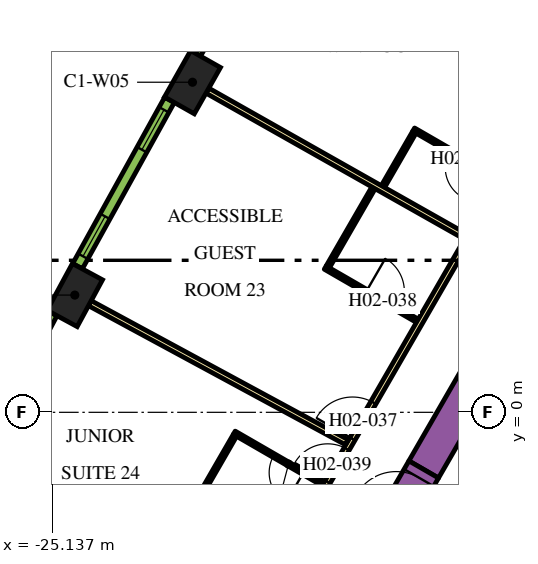
"""IFC4 building model, lengths in metres.
Left out: names, types, materials, properties, quantities, classifications, styles, units other than length and angle.
Written with IfcOpenShell. Run it as: python <this file> out.ifc"""

import sys

from ifc_helpers import new_model, si_unit, direction, frame, frame_2d, origin, origin_2d, place, context, subcontext, project, spatial, rectangle, extrude, element, fill, save


model = new_model("IFC4")
c1 = context("Model", 3, precision=1e-05, world=origin(), true_north=direction((0.0, 1.0)))
c2 = subcontext(c1, "Body", "Model", "MODEL_VIEW")
j1 = project(units=[si_unit("LENGTHUNIT", "METRE"), si_unit("PLANEANGLEUNIT", "RADIAN")], contexts=[c1])
p1 = place(None, origin())
s1 = spatial("IfcSite", under=j1, at=p1, CompositionType="ELEMENT")
p2 = place(p1, origin())
s2 = spatial("IfcBuilding", under=s1, at=p2, CompositionType="ELEMENT")
p3 = place(p2, frame((0.0, 0.0, 47.1)))
s3 = spatial("IfcBuildingStorey", under=s2, at=p3, CompositionType="ELEMENT", Elevation=47.1)
for number, where, z_axis, x_axis in (
    (1, (-21.443, 8.685, 0.0), (0.0, 0.0, 1.0), (-0.492, -0.871, 0.0)),
    (2, (-24.54, 3.085, 0.0), (0.0, 0.0, 1.0), (-0.476, -0.88, 0.0)),
):
    element("IfcColumn", number, at=place(p3, frame(where, z_axis=z_axis, x_axis=x_axis)), inside=s3, PredefinedType="COLUMN", context=c2, shape_type="SweptSolid", body=[
        extrude(rectangle(XDim=1.4, YDim=0.9, at=origin_2d()), origin(), (0.0, 0.0, 1.0), 3.9),
    ])
p4 = place(p3, frame((-15.36, -1.503, 0.0), z_axis=(0.0, 0.0, 1.0), x_axis=(0.50000389221, 0.866023156604, 0.0)))
e3 = element("IfcWall", 3, at=p4, inside=s3, PredefinedType="SOLIDWALL", context=c2, shape_type="SweptSolid", body=[
    extrude(rectangle(XDim=21.0, YDim=0.9, at=frame_2d((10.5, 0.0))), origin(), (0.0, 0.0, 1.0), 3.9),
])
p5 = place(p3, frame((-16.209, -2.976, 0.0), z_axis=(0.0, 0.0, 1.0), x_axis=(0.499954529098, 0.86605165483, 0.0)))
e4 = element("IfcWall", 4, at=p5, inside=s3, PredefinedType="SOLIDWALL", context=c2, shape_type="SweptSolid", body=[
    extrude(rectangle(XDim=1.7, YDim=0.9, at=frame_2d((0.85, 0.0))), origin(), (0.0, 0.0, 1.0), 3.9),
])
p6 = place(p5, frame((0.25, 0.0, 0.0)))
e5 = element("IfcOpeningElement", 5, at=p6, cuts=e4, PredefinedType="OPENING", context=c2, shape_type="SweptSolid", body=[
    extrude(rectangle(XDim=1.2, YDim=2.1, at=frame_2d((0.6, 1.05))), frame((0.0, 0.46, 0.0), z_axis=(0.0, -1.0, 0.0), x_axis=(1.0, 0.0, 0.0)), (0.0, 0.0, 1.0), 0.92),
])
p7 = place(p3, frame((-19.081, -3.9, 0.0), z_axis=(0.0, 0.0, 1.0), x_axis=(0.499998313975, 0.866026377209, 0.0)))
e6 = element("IfcWall", 6, at=p7, inside=s3, PredefinedType="PARTITIONING", context=c2, shape_type="SweptSolid", body=[
    extrude(rectangle(XDim=25.766, YDim=0.15, at=frame_2d((12.883, 0.0))), origin(), (0.0, 0.0, 1.0), 2.75),
])
p8 = place(p7, frame((16.196, 0.0, 0.0)))
e7 = element("IfcOpeningElement", 7, at=p8, cuts=e6, PredefinedType="OPENING", context=c2, shape_type="SweptSolid", body=[
    extrude(rectangle(XDim=1.0, YDim=2.1, at=frame_2d((0.5, 1.05))), frame((0.0, 0.085, 0.0), z_axis=(0.0, -1.0, 0.0), x_axis=(1.0, 0.0, 0.0)), (0.0, 0.0, 1.0), 0.17),
])
p9 = place(p7, frame((14.889, 0.0, 0.0)))
e8 = element("IfcOpeningElement", 8, at=p9, cuts=e6, PredefinedType="OPENING", context=c2, shape_type="SweptSolid", body=[
    extrude(rectangle(XDim=1.0, YDim=2.1, at=frame_2d((0.5, 1.05))), frame((0.0, 0.085, 0.0), z_axis=(0.0, -1.0, 0.0), x_axis=(1.0, 0.0, 0.0)), (0.0, 0.0, 1.0), 0.17),
])
p10 = place(p7, frame((3.698, 0.0, 0.0)))
e9 = element("IfcOpeningElement", 9, at=p10, cuts=e6, PredefinedType="OPENING", context=c2, shape_type="SweptSolid", body=[
    extrude(rectangle(XDim=1.1, YDim=2.1, at=frame_2d((0.55, 1.05))), frame((0.0, 0.085, 0.0), z_axis=(0.0, -1.0, 0.0), x_axis=(1.0, 0.0, 0.0)), (0.0, 0.0, 1.0), 0.17),
])
p11 = place(p7, frame((2.392, 0.0, 0.0)))
e10 = element("IfcOpeningElement", 10, at=p11, cuts=e6, PredefinedType="OPENING", context=c2, shape_type="SweptSolid", body=[
    extrude(rectangle(XDim=1.0, YDim=2.1, at=frame_2d((0.5, 1.05))), frame((0.0, 0.085, 0.0), z_axis=(0.0, -1.0, 0.0), x_axis=(1.0, 0.0, 0.0)), (0.0, 0.0, 1.0), 0.17),
])
p12 = place(p3, frame((-24.145, 2.871, 0.0), z_axis=(0.0, 0.0, 1.0), x_axis=(0.879551725039, -0.475803281809, 0.0)))
e11 = element("IfcWall", 11, at=p12, inside=s3, PredefinedType="PARTITIONING", context=c2, shape_type="SweptSolid", body=[
    extrude(rectangle(XDim=7.688, YDim=0.15, at=frame_2d((3.844, 0.0))), origin(), (0.0, 0.0, 1.0), 2.75),
])
p13 = place(p3, frame((-21.052, 8.464, 0.0), z_axis=(0.0, 0.0, 1.0), x_axis=(0.87059371954, -0.492002617368, 0.0)))
e12 = element("IfcWall", 12, at=p13, inside=s3, PredefinedType="PARTITIONING", context=c2, shape_type="SweptSolid", body=[
    extrude(rectangle(XDim=7.803, YDim=0.15, at=frame_2d((3.902, 0.0))), origin(), (0.0, 0.0, 1.0), 2.75),
])
p14 = place(p3, frame((-13.373, 6.138, 0.0), z_axis=(0.0, 0.0, 1.0), x_axis=(-0.866062058628, 0.499936506574, 0.0)))
e13 = element("IfcWall", 13, at=p14, inside=s3, PredefinedType="PARTITIONING", context=c2, shape_type="SweptSolid", body=[
    extrude(rectangle(XDim=2.6, YDim=0.1, at=frame_2d((1.3, 0.0))), origin(), (0.0, 0.0, 1.0), 2.75),
])
p15 = place(p14, frame((0.6, 0.0, 0.0)))
e14 = element("IfcOpeningElement", 14, at=p15, cuts=e13, PredefinedType="OPENING", context=c2, shape_type="SweptSolid", body=[
    extrude(rectangle(XDim=0.9, YDim=2.1, at=frame_2d((0.45, 1.05))), frame((0.0, 0.06, 0.0), z_axis=(0.0, -1.0, 0.0), x_axis=(1.0, 0.0, 0.0)), (0.0, 0.0, 1.0), 0.12),
])
p16 = place(p3, frame((-15.606, 7.37, 0.0), z_axis=(0.0, 0.0, 1.0), x_axis=(-0.499974350878, -0.866040211805, 0.0)))
e15 = element("IfcWall", 15, at=p16, inside=s3, PredefinedType="PARTITIONING", context=c2, shape_type="SweptSolid", body=[
    extrude(rectangle(XDim=1.65, YDim=0.1, at=frame_2d((0.825, 0.0))), origin(), (0.0, 0.0, 1.0), 2.75),
])
p17 = place(p3, frame((-17.951, 3.808, 0.0), z_axis=(0.0, 0.0, 1.0), x_axis=(0.866034573852, -0.49998411664, 0.0)))
e16 = element("IfcWall", 16, at=p17, inside=s3, PredefinedType="PARTITIONING", context=c2, shape_type="SweptSolid", body=[
    extrude(rectangle(XDim=2.8, YDim=0.1, at=frame_2d((1.4, 0.0))), origin(), (0.0, 0.0, 1.0), 2.75),
])
p18 = place(p17, frame((1.25, 0.0, 0.0)))
e17 = element("IfcOpeningElement", 17, at=p18, cuts=e16, PredefinedType="OPENING", context=c2, shape_type="SweptSolid", body=[
    extrude(rectangle(XDim=1.0, YDim=2.1, at=frame_2d((0.5, 1.05))), frame((0.0, 0.06, 0.0), z_axis=(0.0, -1.0, 0.0), x_axis=(1.0, 0.0, 0.0)), (0.0, 0.0, 1.0), 0.12),
])
p19 = place(p3, frame((-17.878, 3.835, 0.0), z_axis=(0.0, 0.0, 1.0), x_axis=(0.500061428766, 0.865989934965, 0.0)))
e18 = element("IfcWall", 18, at=p19, inside=s3, PredefinedType="PARTITIONING", context=c2, shape_type="SweptSolid", body=[
    extrude(rectangle(XDim=2.39, YDim=0.1, at=frame_2d((1.195, 0.0))), origin(), (0.0, 0.0, 1.0), 2.75),
])
p20 = place(p3, frame((-18.006, -1.888, 0.0), z_axis=(0.0, 0.0, 1.0), x_axis=(-0.866036505625, 0.499980770555, 0.0)))
e19 = element("IfcWall", 19, at=p20, inside=s3, PredefinedType="PARTITIONING", context=c2, shape_type="SweptSolid", body=[
    extrude(rectangle(XDim=2.7, YDim=0.1, at=frame_2d((1.35, 0.0))), origin(), (0.0, 0.0, 1.0), 2.75),
])
p21 = place(p20, frame((0.6, 0.0, 0.0)))
e20 = element("IfcOpeningElement", 20, at=p21, cuts=e19, PredefinedType="OPENING", context=c2, shape_type="SweptSolid", body=[
    extrude(rectangle(XDim=0.9, YDim=2.1, at=frame_2d((0.45, 1.05))), frame((0.0, 0.06, 0.0), z_axis=(0.0, -1.0, 0.0), x_axis=(1.0, 0.0, 0.0)), (0.0, 0.0, 1.0), 0.12),
])
p22 = place(p3, frame((-20.326, -0.606, 0.0), z_axis=(0.0, 0.0, 1.0), x_axis=(-0.499946605688, -0.86605622881, 0.0)))
e21 = element("IfcWall", 21, at=p22, inside=s3, PredefinedType="PARTITIONING", context=c2, shape_type="SweptSolid", body=[
    extrude(rectangle(XDim=2.2, YDim=0.1, at=frame_2d((1.1, 0.0))), origin(), (0.0, 0.0, 1.0), 2.75),
])
p23 = place(p3, frame((-18.858, 13.773, 0.0), z_axis=(0.0, 0.0, 1.0), x_axis=(-0.50002123722, -0.866013142123, 0.0)))
e22 = element("IfcWall", 22, at=p23, inside=s3, PredefinedType="SOLIDWALL", context=c2, shape_type="SweptSolid", body=[
    extrude(rectangle(XDim=4.998, YDim=0.29, at=frame_2d((2.499, 0.0))), origin(), (0.0, 0.0, 1.0), 3.65),
])
p24 = place(p23, frame((0.297, 0.0, 0.9)))
e23 = element("IfcOpeningElement", 23, at=p24, cuts=e22, PredefinedType="OPENING", context=c2, shape_type="SweptSolid", body=[
    extrude(rectangle(XDim=1.2, YDim=2.15, at=frame_2d((0.6, 1.075))), frame((0.0, 0.155, 0.0), z_axis=(0.0, -1.0, 0.0), x_axis=(1.0, 0.0, 0.0)), (0.0, 0.0, 1.0), 0.31),
])
p25 = place(p23, frame((3.501, 0.0, 0.9)))
e24 = element("IfcOpeningElement", 24, at=p25, cuts=e22, PredefinedType="OPENING", context=c2, shape_type="SweptSolid", body=[
    extrude(rectangle(XDim=1.2, YDim=2.15, at=frame_2d((0.6, 1.075))), frame((0.0, 0.155, 0.0), z_axis=(0.0, -1.0, 0.0), x_axis=(1.0, 0.0, 0.0)), (0.0, 0.0, 1.0), 0.31),
])
p26 = place(p3, frame((-22.05, 8.22, 0.0), z_axis=(0.0, 0.0, 1.0), x_axis=(-0.483912572871, -0.875116347589, 0.0)))
e25 = element("IfcWall", 25, at=p26, inside=s3, PredefinedType="SOLIDWALL", context=c2, shape_type="SweptSolid", body=[
    extrude(rectangle(XDim=4.998, YDim=0.29, at=frame_2d((2.499, 0.0))), origin(), (0.0, 0.0, 1.0), 3.65),
])
p27 = place(p26, frame((0.297, 0.0, 0.9)))
e26 = element("IfcOpeningElement", 26, at=p27, cuts=e25, PredefinedType="OPENING", context=c2, shape_type="SweptSolid", body=[
    extrude(rectangle(XDim=1.2, YDim=2.15, at=frame_2d((0.6, 1.075))), frame((0.0, 0.155, 0.0), z_axis=(0.0, -1.0, 0.0), x_axis=(1.0, 0.0, 0.0)), (0.0, 0.0, 1.0), 0.31),
])
p28 = place(p26, frame((3.501, 0.0, 0.9)))
e27 = element("IfcOpeningElement", 27, at=p28, cuts=e25, PredefinedType="OPENING", context=c2, shape_type="SweptSolid", body=[
    extrude(rectangle(XDim=1.2, YDim=2.15, at=frame_2d((0.6, 1.075))), frame((0.0, 0.155, 0.0), z_axis=(0.0, -1.0, 0.0), x_axis=(1.0, 0.0, 0.0)), (0.0, 0.0, 1.0), 0.31),
])
p29 = place(p3, frame((-25.138, 2.608, 0.0), z_axis=(0.0, 0.0, 1.0), x_axis=(-0.467629620899, -0.883924509026, 0.0)))
e28 = element("IfcWall", 28, at=p29, inside=s3, PredefinedType="SOLIDWALL", context=c2, shape_type="SweptSolid", body=[
    extrude(rectangle(XDim=4.998, YDim=0.29, at=frame_2d((2.499, 0.0))), origin(), (0.0, 0.0, 1.0), 3.65),
])
p30 = place(p29, frame((0.297, 0.0, 0.9)))
e29 = element("IfcOpeningElement", 29, at=p30, cuts=e28, PredefinedType="OPENING", context=c2, shape_type="SweptSolid", body=[
    extrude(rectangle(XDim=1.2, YDim=2.15, at=frame_2d((0.6, 1.075))), frame((0.0, 0.155, 0.0), z_axis=(0.0, -1.0, 0.0), x_axis=(1.0, 0.0, 0.0)), (0.0, 0.0, 1.0), 0.31),
])
p31 = place(p29, frame((3.501, 0.0, 0.9)))
e30 = element("IfcOpeningElement", 30, at=p31, cuts=e28, PredefinedType="OPENING", context=c2, shape_type="SweptSolid", body=[
    extrude(rectangle(XDim=1.2, YDim=2.15, at=frame_2d((0.6, 1.075))), frame((0.0, 0.155, 0.0), z_axis=(0.0, -1.0, 0.0), x_axis=(1.0, 0.0, 0.0)), (0.0, 0.0, 1.0), 0.31),
])
p32 = place(p6, origin())
e31 = element("IfcDoor", 31, at=p32, inside=s3, OperationType="SINGLE_SWING_LEFT", PredefinedType="DOOR", context=c2, shape_type="SweptSolid", body=[
    extrude(rectangle(XDim=1.2, YDim=2.1, at=frame_2d((0.6, 1.05))), frame((0.0, 0.025, 0.0), z_axis=(0.0, -1.0, 0.0), x_axis=(1.0, 0.0, 0.0)), (0.0, 0.0, 1.0), 0.05),
])
fill(e5, e31)
p33 = place(p15, origin())
e32 = element("IfcDoor", 32, at=p33, inside=s3, OperationType="SINGLE_SWING_LEFT", PredefinedType="DOOR", context=c2, shape_type="SweptSolid", body=[
    extrude(rectangle(XDim=0.9, YDim=2.1, at=frame_2d((0.45, 1.05))), frame((0.0, 0.025, 0.0), z_axis=(0.0, -1.0, 0.0), x_axis=(1.0, 0.0, 0.0)), (0.0, 0.0, 1.0), 0.05),
])
fill(e14, e32)
p34 = place(p10, origin())
e33 = element("IfcDoor", 33, at=p34, inside=s3, OperationType="SINGLE_SWING_LEFT", PredefinedType="DOOR", context=c2, shape_type="SweptSolid", body=[
    extrude(rectangle(XDim=1.1, YDim=2.1, at=frame_2d((0.55, 1.05))), frame((0.0, 0.025, 0.0), z_axis=(0.0, -1.0, 0.0), x_axis=(1.0, 0.0, 0.0)), (0.0, 0.0, 1.0), 0.05),
])
fill(e9, e33)
p35 = place(p18, origin())
e34 = element("IfcDoor", 34, at=p35, inside=s3, OperationType="SINGLE_SWING_LEFT", PredefinedType="DOOR", context=c2, shape_type="SweptSolid", body=[
    extrude(rectangle(XDim=1.0, YDim=2.1, at=frame_2d((0.5, 1.05))), frame((0.0, 0.025, 0.0), z_axis=(0.0, -1.0, 0.0), x_axis=(1.0, 0.0, 0.0)), (0.0, 0.0, 1.0), 0.05),
])
fill(e17, e34)
p36 = place(p11, origin())
e35 = element("IfcDoor", 35, at=p36, inside=s3, OperationType="SINGLE_SWING_RIGHT", PredefinedType="DOOR", context=c2, shape_type="SweptSolid", body=[
    extrude(rectangle(XDim=1.0, YDim=2.1, at=frame_2d((0.5, 1.05))), frame((0.0, 0.025, 0.0), z_axis=(0.0, -1.0, 0.0), x_axis=(1.0, 0.0, 0.0)), (0.0, 0.0, 1.0), 0.05),
])
fill(e10, e35)
p37 = place(p21, origin())
e36 = element("IfcDoor", 36, at=p37, inside=s3, OperationType="SINGLE_SWING_RIGHT", PredefinedType="DOOR", context=c2, shape_type="SweptSolid", body=[
    extrude(rectangle(XDim=0.9, YDim=2.1, at=frame_2d((0.45, 1.05))), frame((0.0, 0.025, 0.0), z_axis=(0.0, -1.0, 0.0), x_axis=(1.0, 0.0, 0.0)), (0.0, 0.0, 1.0), 0.05),
])
fill(e20, e36)
p38 = place(p27, origin())
e37 = element("IfcWindow", 37, at=p38, inside=s3, PartitioningType="DOUBLE_PANEL_VERTICAL", PredefinedType="WINDOW", context=c2, shape_type="SweptSolid", body=[
    extrude(rectangle(XDim=1.2, YDim=2.15, at=frame_2d((0.6, 1.075))), frame((0.0, 0.015, 0.0), z_axis=(0.0, -1.0, 0.0), x_axis=(1.0, 0.0, 0.0)), (0.0, 0.0, 1.0), 0.06),
])
fill(e26, e37)
p39 = place(p28, origin())
e38 = element("IfcWindow", 38, at=p39, inside=s3, PartitioningType="DOUBLE_PANEL_VERTICAL", PredefinedType="WINDOW", context=c2, shape_type="SweptSolid", body=[
    extrude(rectangle(XDim=1.2, YDim=2.15, at=frame_2d((0.6, 1.075))), frame((0.0, 0.015, 0.0), z_axis=(0.0, -1.0, 0.0), x_axis=(1.0, 0.0, 0.0)), (0.0, 0.0, 1.0), 0.06),
])
fill(e27, e38)
save(model, sys.argv[1])
